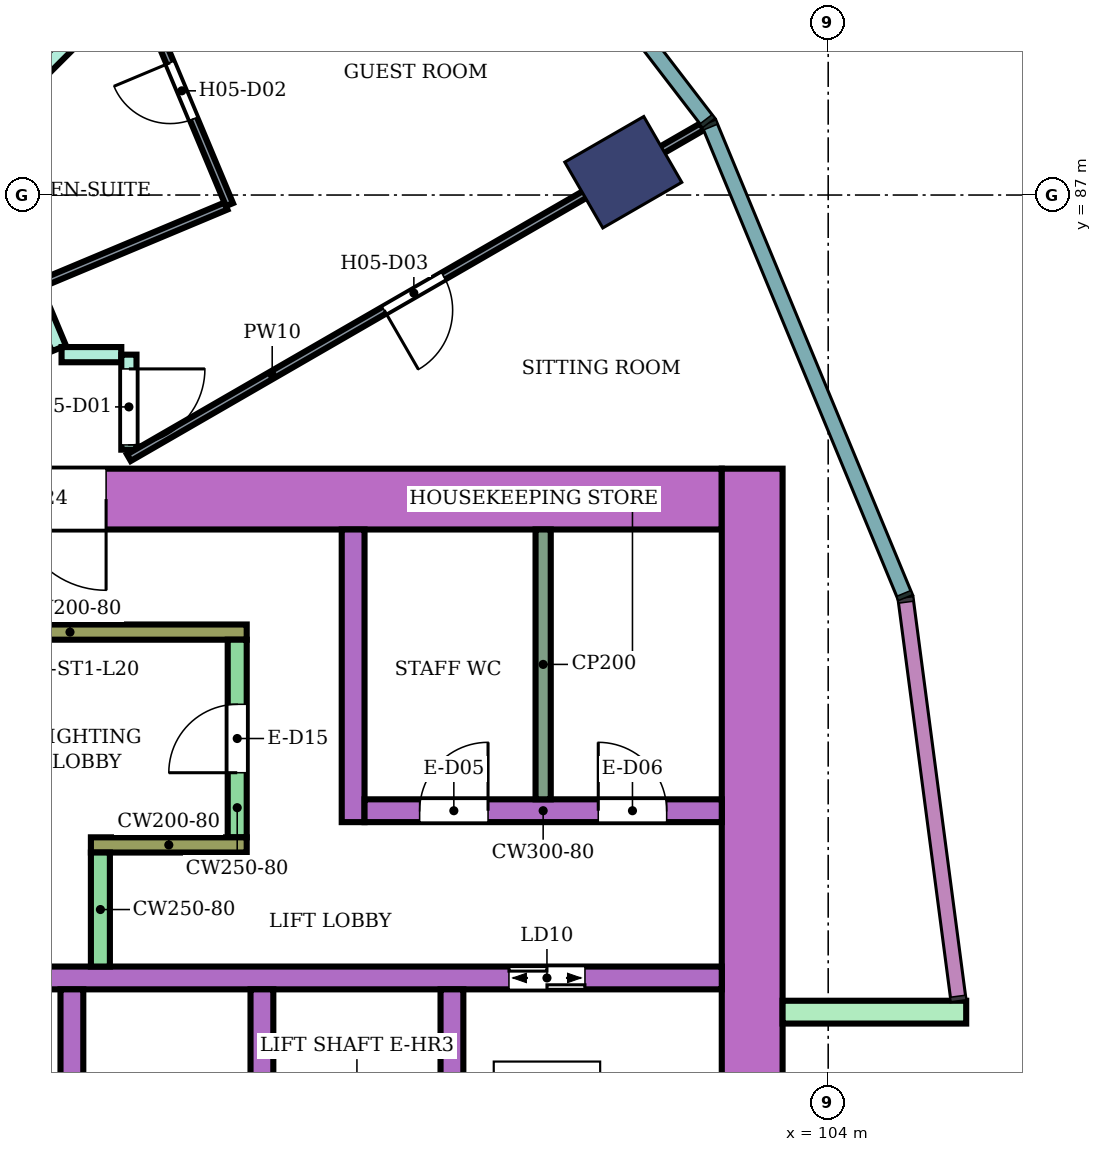
"""IFC4 building model, lengths in metres.
Left out: names, types, materials, properties, quantities, classifications, styles, units other than length and angle.
Written with IfcOpenShell. Run it as: python <this file> out.ifc"""

import sys

from ifc_helpers import new_model, si_unit, direction, frame, frame_2d, origin, origin_2d, place, context, subcontext, project, spatial, rectangle, extrude, element, fill, save


model = new_model("IFC4")
c1 = context("Model", 3, precision=1e-05, world=origin(), true_north=direction((0.0, 1.0)))
c2 = subcontext(c1, "Body", "Model", "MODEL_VIEW")
j1 = project(units=[si_unit("LENGTHUNIT", "METRE"), si_unit("PLANEANGLEUNIT", "RADIAN")], contexts=[c1])
p1 = place(None, origin())
s1 = spatial("IfcSite", under=j1, at=p1, CompositionType="ELEMENT")
p2 = place(p1, origin())
s2 = spatial("IfcBuilding", under=s1, at=p2, CompositionType="ELEMENT")
p3 = place(p2, frame((0.0, 0.0, 90.0)))
s3 = spatial("IfcBuildingStorey", under=s2, at=p3, CompositionType="ELEMENT", Elevation=90.0)
p4 = place(p3, frame((101.304, 87.3, 0.0), z_axis=(0.0, 0.0, 1.0), x_axis=(0.866025403784, 0.5, 0.0)))
e1 = element("IfcColumn", 1, at=p4, inside=s3, PredefinedType="COLUMN", context=c2, shape_type="SweptSolid", body=[
    extrude(rectangle(XDim=1.2, YDim=1.0, at=origin_2d()), origin(), (0.0, 0.0, 1.0), 3.8),
])
p5 = place(p3, frame((87.9, 83.0, 0.0), z_axis=(0.0, 0.0, 1.0), x_axis=(1.0, 0.0, 0.0)))
e2 = element("IfcWall", 2, at=p5, inside=s3, PredefinedType="SHEAR", context=c2, shape_type="SweptSolid", body=[
    extrude(rectangle(XDim=14.7, YDim=0.8, at=frame_2d((7.35, 0.0))), origin(), (0.0, 0.0, 1.0), 3.48),
])
p6 = place(p5, frame((4.2, 0.0, 0.0)))
e3 = element("IfcOpeningElement", 3, at=p6, cuts=e2, PredefinedType="OPENING", context=c2, shape_type="SweptSolid", body=[
    extrude(rectangle(XDim=2.4, YDim=2.4, at=frame_2d((1.2, 1.2))), frame((0.0, 0.41, 0.0), z_axis=(0.0, -1.0, 0.0), x_axis=(1.0, 0.0, 0.0)), (0.0, 0.0, 1.0), 0.82),
])
p7 = place(p3, frame((103.0, 66.6, 0.0), z_axis=(0.0, 0.0, 1.0), x_axis=(0.0, 1.0, 0.0)))
e4 = element("IfcWall", 4, at=p7, inside=s3, PredefinedType="SHEAR", context=c2, shape_type="SweptSolid", body=[
    extrude(rectangle(XDim=16.8, YDim=0.8, at=frame_2d((8.4, 0.0))), origin(), (0.0, 0.0, 1.0), 3.48),
])
p8 = place(p3, frame((91.7, 76.7, 0.0), z_axis=(0.0, 0.0, 1.0), x_axis=(1.0, 0.0, 0.0)))
e5 = element("IfcWall", 5, at=p8, inside=s3, PredefinedType="SHEAR", context=c2, shape_type="SweptSolid", body=[
    extrude(rectangle(XDim=10.9, YDim=0.3, at=frame_2d((5.45, 0.0))), origin(), (0.0, 0.0, 1.0), 3.48),
])
p9 = place(p8, frame((0.55, 0.0, 0.0)))
e6 = element("IfcOpeningElement", 6, at=p9, cuts=e5, PredefinedType="OPENING", context=c2, shape_type="SweptSolid", body=[
    extrude(rectangle(XDim=1.1, YDim=2.1, at=frame_2d((0.55, 1.05))), frame((0.0, 0.16, 0.0), z_axis=(0.0, -1.0, 0.0), x_axis=(1.0, 0.0, 0.0)), (0.0, 0.0, 1.0), 0.32),
])
p10 = place(p8, frame((8.1, 0.0, 0.0)))
e7 = element("IfcOpeningElement", 7, at=p10, cuts=e5, PredefinedType="OPENING", context=c2, shape_type="SweptSolid", body=[
    extrude(rectangle(XDim=1.0, YDim=2.1, at=frame_2d((0.5, 1.05))), frame((0.0, 0.16, 0.0), z_axis=(0.0, -1.0, 0.0), x_axis=(1.0, 0.0, 0.0)), (0.0, 0.0, 1.0), 0.32),
])
for number, where, z_axis, x_axis in (
    (8, (94.05, 74.0, 0.0), (0.0, 0.0, 1.0), (0.0, 1.0, 0.0)),
    (9, (96.55, 74.0, 0.0), (0.0, 0.0, 1.0), (0.0, 1.0, 0.0)),
    (10, (99.05, 74.0, 0.0), (0.0, 0.0, 1.0), (0.0, 1.0, 0.0)),
):
    element("IfcWall", number, at=place(p3, frame(where, z_axis=z_axis, x_axis=x_axis)), inside=s3, PredefinedType="SHEAR", context=c2, shape_type="SweptSolid", body=[
        extrude(rectangle(XDim=2.55, YDim=0.3, at=frame_2d((1.275, 0.0))), origin(), (0.0, 0.0, 1.0), 3.48),
    ])
p11 = place(p3, frame((91.7, 81.25, 0.0), z_axis=(0.0, 0.0, 1.0), x_axis=(1.0, 0.0, 0.0)))
e11 = element("IfcWall", 11, at=p11, inside=s3, PredefinedType="SHEAR", context=c2, shape_type="SweptSolid", body=[
    extrude(rectangle(XDim=4.65, YDim=0.2, at=frame_2d((2.325, 0.0))), origin(), (0.0, 0.0, 1.0), 3.48),
])
p12 = place(p3, frame((96.225, 78.55, 0.0), z_axis=(0.0, 0.0, 1.0), x_axis=(0.0, 1.0, 0.0)))
e12 = element("IfcWall", 12, at=p12, inside=s3, PredefinedType="SHEAR", context=c2, shape_type="SweptSolid", body=[
    extrude(rectangle(XDim=2.6, YDim=0.25, at=frame_2d((1.3, 0.0))), origin(), (0.0, 0.0, 1.0), 3.48),
])
p13 = place(p12, frame((0.85, 0.0, 0.0)))
e13 = element("IfcOpeningElement", 13, at=p13, cuts=e12, PredefinedType="OPENING", context=c2, shape_type="SweptSolid", body=[
    extrude(rectangle(XDim=0.9, YDim=2.1, at=frame_2d((0.45, 1.05))), frame((0.0, 0.135, 0.0), z_axis=(0.0, -1.0, 0.0), x_axis=(1.0, 0.0, 0.0)), (0.0, 0.0, 1.0), 0.27),
])
p14 = place(p3, frame((94.3, 78.45, 0.0), z_axis=(0.0, 0.0, 1.0), x_axis=(1.0, 0.0, 0.0)))
e14 = element("IfcWall", 14, at=p14, inside=s3, PredefinedType="SHEAR", context=c2, shape_type="SweptSolid", body=[
    extrude(rectangle(XDim=2.05, YDim=0.2, at=frame_2d((1.025, 0.0))), origin(), (0.0, 0.0, 1.0), 3.48),
])
p15 = place(p3, frame((94.425, 76.85, 0.0), z_axis=(0.0, 0.0, 1.0), x_axis=(0.0, 1.0, 0.0)))
e15 = element("IfcWall", 15, at=p15, inside=s3, PredefinedType="SHEAR", context=c2, shape_type="SweptSolid", body=[
    extrude(rectangle(XDim=1.5, YDim=0.25, at=frame_2d((0.75, 0.0))), origin(), (0.0, 0.0, 1.0), 3.48),
])
p16 = place(p3, frame((97.75, 78.75, 0.0), z_axis=(0.0, 0.0, 1.0), x_axis=(0.0, 1.0, 0.0)))
e16 = element("IfcWall", 16, at=p16, inside=s3, PredefinedType="SHEAR", context=c2, shape_type="SweptSolid", body=[
    extrude(rectangle(XDim=3.85, YDim=0.3, at=frame_2d((1.925, 0.0))), origin(), (0.0, 0.0, 1.0), 3.48),
])
p17 = place(p3, frame((97.9, 78.9, 0.0), z_axis=(0.0, 0.0, 1.0), x_axis=(1.0, 0.0, 0.0)))
e17 = element("IfcWall", 17, at=p17, inside=s3, PredefinedType="SHEAR", context=c2, shape_type="SweptSolid", body=[
    extrude(rectangle(XDim=4.7, YDim=0.3, at=frame_2d((2.35, 0.0))), origin(), (0.0, 0.0, 1.0), 3.48),
])
p18 = place(p17, frame((0.725, 0.0, 0.0)))
e18 = element("IfcOpeningElement", 18, at=p18, cuts=e17, PredefinedType="OPENING", context=c2, shape_type="SweptSolid", body=[
    extrude(rectangle(XDim=0.9, YDim=2.1, at=frame_2d((0.45, 1.05))), frame((0.0, 0.16, 0.0), z_axis=(0.0, -1.0, 0.0), x_axis=(1.0, 0.0, 0.0)), (0.0, 0.0, 1.0), 0.32),
])
p19 = place(p17, frame((3.075, 0.0, 0.0)))
e19 = element("IfcOpeningElement", 19, at=p19, cuts=e17, PredefinedType="OPENING", context=c2, shape_type="SweptSolid", body=[
    extrude(rectangle(XDim=0.9, YDim=2.1, at=frame_2d((0.45, 1.05))), frame((0.0, 0.16, 0.0), z_axis=(0.0, -1.0, 0.0), x_axis=(1.0, 0.0, 0.0)), (0.0, 0.0, 1.0), 0.32),
])
p20 = place(p3, frame((103.4, 76.25, 0.0), z_axis=(0.0, 0.0, 1.0), x_axis=(1.0, 0.0, 0.0)))
e20 = element("IfcWall", 20, at=p20, inside=s3, PredefinedType="NOTDEFINED", context=c2, shape_type="SweptSolid", body=[
    extrude(rectangle(XDim=2.416, YDim=0.3, at=frame_2d((1.208, 0.0))), origin(), (0.0, 0.0, 1.0), 3.8),
])
p21 = place(p3, frame((90.604, 92.805, 0.0), z_axis=(0.0, 0.0, 1.0), x_axis=(0.386209298583, -0.922411176042, 0.0)))
e21 = element("IfcWall", 21, at=p21, inside=s3, PredefinedType="PARTITIONING", context=c2, shape_type="SweptSolid", body=[
    extrude(rectangle(XDim=8.48, YDim=0.2, at=frame_2d((4.24, 0.0))), origin(), (0.0, 0.0, 1.0), 3.35),
])
p22 = place(p21, frame((3.723, 0.0, 0.0)))
e22 = element("IfcOpeningElement", 22, at=p22, cuts=e21, PredefinedType="OPENING", context=c2, shape_type="SweptSolid", body=[
    extrude(rectangle(XDim=1.1, YDim=2.1, at=frame_2d((0.55, 1.05))), frame((0.0, 0.11, 0.0), z_axis=(0.0, -1.0, 0.0), x_axis=(1.0, 0.0, 0.0)), (0.0, 0.0, 1.0), 0.22),
])
p23 = place(p3, frame((92.832, 87.824, 0.0), z_axis=(0.0, 0.0, 1.0), x_axis=(0.707251566381, 0.70696196634, 0.0)))
e23 = element("IfcWall", 23, at=p23, inside=s3, PredefinedType="PARTITIONING", context=c2, shape_type="SweptSolid", body=[
    extrude(rectangle(XDim=5.058, YDim=0.2, at=frame_2d((2.529, 0.0))), origin(), (0.0, 0.0, 1.0), 3.35),
])
p24 = place(p3, frame((93.914, 84.9, 0.0), z_axis=(0.0, 0.0, 1.0), x_axis=(1.0, 0.0, 0.0)))
e24 = element("IfcWall", 24, at=p24, inside=s3, PredefinedType="PARTITIONING", context=c2, shape_type="SweptSolid", body=[
    extrude(rectangle(XDim=0.786, YDim=0.2, at=frame_2d((0.393, 0.0))), origin(), (0.0, 0.0, 1.0), 3.35),
])
p25 = place(p3, frame((94.8, 83.65, 0.0), z_axis=(0.0, 0.0, 1.0), x_axis=(0.0, 1.0, 0.0)))
e25 = element("IfcWall", 25, at=p25, inside=s3, PredefinedType="PARTITIONING", context=c2, shape_type="SweptSolid", body=[
    extrude(rectangle(XDim=1.25, YDim=0.2, at=frame_2d((0.625, 0.0))), origin(), (0.0, 0.0, 1.0), 3.35),
])
p26 = place(p25, frame((0.062, 0.0, 0.0)))
e26 = element("IfcOpeningElement", 26, at=p26, cuts=e25, PredefinedType="OPENING", context=c2, shape_type="SweptSolid", body=[
    extrude(rectangle(XDim=1.0, YDim=2.1, at=frame_2d((0.5, 1.05))), frame((0.0, 0.11, 0.0), z_axis=(0.0, -1.0, 0.0), x_axis=(1.0, 0.0, 0.0)), (0.0, 0.0, 1.0), 0.22),
])
p27 = place(p3, frame((93.633, 85.831, 0.0), z_axis=(0.0, 0.0, 1.0), x_axis=(0.922344808264, 0.38636777126, 0.0)))
e27 = element("IfcWall", 27, at=p27, inside=s3, PredefinedType="PARTITIONING", context=c2, shape_type="SweptSolid", body=[
    extrude(rectangle(XDim=2.65, YDim=0.1, at=frame_2d((1.325, 0.0))), origin(), (0.0, 0.0, 1.0), 3.35),
])
p28 = place(p3, frame((94.8, 83.545, 0.0), z_axis=(0.0, 0.0, 1.0), x_axis=(0.86602264145, 0.500004784474, 0.0)))
e28 = element("IfcWall", 28, at=p28, inside=s3, PredefinedType="PARTITIONING", context=c2, shape_type="SweptSolid", body=[
    extrude(rectangle(XDim=8.708, YDim=0.1, at=frame_2d((4.354, 0.0))), origin(), (0.0, 0.0, 1.0), 3.35),
])
p29 = place(p28, frame((3.879, 0.0, 0.0)))
e29 = element("IfcOpeningElement", 29, at=p29, cuts=e28, PredefinedType="OPENING", context=c2, shape_type="SweptSolid", body=[
    extrude(rectangle(XDim=0.9, YDim=2.1, at=frame_2d((0.45, 1.05))), frame((0.0, 0.06, 0.0), z_axis=(0.0, -1.0, 0.0), x_axis=(1.0, 0.0, 0.0)), (0.0, 0.0, 1.0), 0.12),
])
p30 = place(p3, frame((94.919, 89.748, 0.0), z_axis=(0.0, 0.0, 1.0), x_axis=(0.38635048828, -0.922352047868, 0.0)))
e30 = element("IfcWall", 30, at=p30, inside=s3, PredefinedType="PARTITIONING", context=c2, shape_type="SweptSolid", body=[
    extrude(rectangle(XDim=3.116, YDim=0.1, at=frame_2d((1.558, 0.0))), origin(), (0.0, 0.0, 1.0), 3.35),
])
p31 = place(p30, frame((1.093, 0.0, 0.0)))
e31 = element("IfcOpeningElement", 31, at=p31, cuts=e30, PredefinedType="OPENING", context=c2, shape_type="SweptSolid", body=[
    extrude(rectangle(XDim=0.8, YDim=2.1, at=frame_2d((0.4, 1.05))), frame((0.0, 0.06, 0.0), z_axis=(0.0, -1.0, 0.0), x_axis=(1.0, 0.0, 0.0)), (0.0, 0.0, 1.0), 0.12),
])
p32 = place(p3, frame((100.25, 79.05, 0.0), z_axis=(0.0, 0.0, 1.0), x_axis=(0.0, 1.0, 0.0)))
e32 = element("IfcWall", 32, at=p32, inside=s3, PredefinedType="PARTITIONING", context=c2, shape_type="SweptSolid", body=[
    extrude(rectangle(XDim=3.55, YDim=0.2, at=frame_2d((1.775, 0.0))), origin(), (0.0, 0.0, 1.0), 3.48),
])
p33 = place(p26, frame((1.0, 0.0, 0.0), z_axis=(0.0, 0.0, 1.0), x_axis=(-1.0, 0.0, 0.0)))
e33 = element("IfcDoor", 33, at=p33, inside=s3, OperationType="SINGLE_SWING_LEFT", PredefinedType="DOOR", context=c2, shape_type="SweptSolid", body=[
    extrude(rectangle(XDim=1.0, YDim=2.1, at=frame_2d((0.5, 1.05))), frame((0.0, 0.025, 0.0), z_axis=(0.0, -1.0, 0.0), x_axis=(1.0, 0.0, 0.0)), (0.0, 0.0, 1.0), 0.05),
])
fill(e26, e33)
p34 = place(p31, frame((0.8, 0.0, 0.0), z_axis=(0.0, 0.0, 1.0), x_axis=(-1.0, 0.0, 0.0)))
e34 = element("IfcDoor", 34, at=p34, inside=s3, OperationType="SINGLE_SWING_RIGHT", PredefinedType="DOOR", context=c2, shape_type="SweptSolid", body=[
    extrude(rectangle(XDim=0.8, YDim=2.1, at=frame_2d((0.4, 1.05))), frame((0.0, 0.025, 0.0), z_axis=(0.0, -1.0, 0.0), x_axis=(1.0, 0.0, 0.0)), (0.0, 0.0, 1.0), 0.05),
])
fill(e31, e34)
p35 = place(p29, frame((0.9, 0.0, 0.0), z_axis=(0.0, 0.0, 1.0), x_axis=(-1.0, 0.0, 0.0)))
e35 = element("IfcDoor", 35, at=p35, inside=s3, OperationType="SINGLE_SWING_RIGHT", PredefinedType="DOOR", context=c2, shape_type="SweptSolid", body=[
    extrude(rectangle(XDim=0.9, YDim=2.1, at=frame_2d((0.45, 1.05))), frame((0.0, 0.025, 0.0), z_axis=(0.0, -1.0, 0.0), x_axis=(1.0, 0.0, 0.0)), (0.0, 0.0, 1.0), 0.05),
])
fill(e29, e35)
p36 = place(p10, origin())
e36 = element("IfcDoor", 36, at=p36, inside=s3, OperationType="DOUBLE_DOOR_SLIDING", PredefinedType="DOOR", context=c2, shape_type="SweptSolid", body=[
    extrude(rectangle(XDim=1.0, YDim=2.1, at=frame_2d((0.5, 1.05))), frame((0.0, 0.025, 0.0), z_axis=(0.0, -1.0, 0.0), x_axis=(1.0, 0.0, 0.0)), (0.0, 0.0, 1.0), 0.05),
])
fill(e7, e36)
p37 = place(p13, origin())
e37 = element("IfcDoor", 37, at=p37, inside=s3, OperationType="SINGLE_SWING_LEFT", PredefinedType="DOOR", context=c2, shape_type="SweptSolid", body=[
    extrude(rectangle(XDim=0.9, YDim=2.1, at=frame_2d((0.45, 1.05))), frame((0.0, 0.025, 0.0), z_axis=(0.0, -1.0, 0.0), x_axis=(1.0, 0.0, 0.0)), (0.0, 0.0, 1.0), 0.05),
])
fill(e13, e37)
p38 = place(p18, origin())
e38 = element("IfcDoor", 38, at=p38, inside=s3, OperationType="SINGLE_SWING_RIGHT", PredefinedType="DOOR", context=c2, shape_type="SweptSolid", body=[
    extrude(rectangle(XDim=0.9, YDim=2.1, at=frame_2d((0.45, 1.05))), frame((0.0, 0.025, 0.0), z_axis=(0.0, -1.0, 0.0), x_axis=(1.0, 0.0, 0.0)), (0.0, 0.0, 1.0), 0.05),
])
fill(e18, e38)
p39 = place(p19, origin())
e39 = element("IfcDoor", 39, at=p39, inside=s3, OperationType="SINGLE_SWING_LEFT", PredefinedType="DOOR", context=c2, shape_type="SweptSolid", body=[
    extrude(rectangle(XDim=0.9, YDim=2.1, at=frame_2d((0.45, 1.05))), frame((0.0, 0.025, 0.0), z_axis=(0.0, -1.0, 0.0), x_axis=(1.0, 0.0, 0.0)), (0.0, 0.0, 1.0), 0.05),
])
fill(e19, e39)
p40 = place(p6, frame((2.4, 0.0, 0.0), z_axis=(0.0, 0.0, 1.0), x_axis=(-1.0, 0.0, 0.0)))
e40 = element("IfcDoor", 40, at=p40, inside=s3, OperationType="DOUBLE_DOOR_SINGLE_SWING", PredefinedType="DOOR", context=c2, shape_type="SweptSolid", body=[
    extrude(rectangle(XDim=2.4, YDim=2.4, at=frame_2d((1.2, 1.2))), frame((0.0, 0.025, 0.0), z_axis=(0.0, -1.0, 0.0), x_axis=(1.0, 0.0, 0.0)), (0.0, 0.0, 1.0), 0.05),
])
fill(e3, e40)
save(model, sys.argv[1])
